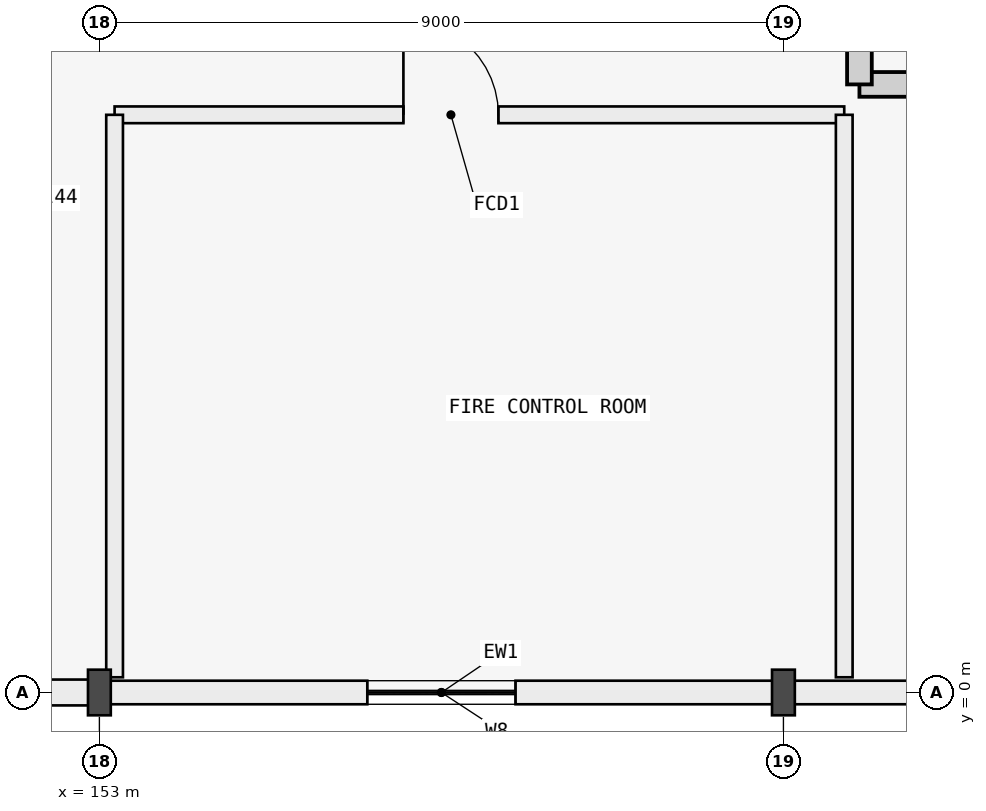
"""IFC4 building model, lengths in metres.
Left out: names, types, materials, properties, quantities, classifications, styles, units other than length and angle.
Written with IfcOpenShell. Run it as: python <this file> out.ifc"""

import sys

from ifc_helpers import new_model, si_unit, direction, frame, frame_2d, origin, origin_2d, place, context, subcontext, project, spatial, rectangle, i_section, extrude, element, fill, save


model = new_model("IFC4")
c1 = context("Model", 3, precision=1e-05, world=origin(), true_north=direction((0.0, 1.0)))
c2 = subcontext(c1, "Body", "Model", "MODEL_VIEW")
j1 = project(units=[si_unit("LENGTHUNIT", "METRE"), si_unit("PLANEANGLEUNIT", "RADIAN")], contexts=[c1])
p1 = place(None, origin())
s1 = spatial("IfcSite", under=j1, at=p1, CompositionType="ELEMENT")
p2 = place(p1, origin())
s2 = spatial("IfcBuilding", under=s1, at=p2, CompositionType="ELEMENT")
p3 = place(p2, origin())
s3 = spatial("IfcBuildingStorey", under=s2, at=p3, CompositionType="ELEMENT", Elevation=0.0)
for number, where, z_axis, x_axis in (
    (1, (153.0, 0.0, 0.0), (0.0, 0.0, 1.0), (1.0, 0.0, 0.0)),
    (2, (162.0, 0.0, 0.0), (0.0, 0.0, 1.0), (1.0, 0.0, 0.0)),
):
    element("IfcColumn", number, at=place(p3, frame(where, z_axis=z_axis, x_axis=x_axis)), inside=s3, PredefinedType="COLUMN", context=c2, shape_type="SweptSolid", body=[
        extrude(i_section(OverallWidth=0.3, OverallDepth=0.6, WebThickness=0.015, FlangeThickness=0.03, FilletRadius=0.027, at=origin_2d()), origin(), (0.0, 0.0, 1.0), 4.2),
    ])
p4 = place(p3, frame((144.009, 0.0, 0.0), z_axis=(0.0, 0.0, 1.0), x_axis=(1.0, 0.0, 0.0)))
e3 = element("IfcWall", 3, at=p4, inside=s3, PredefinedType="STANDARD", context=c2, shape_type="SweptSolid", body=[
    extrude(rectangle(XDim=8.983, YDim=0.34, at=frame_2d((4.492, 0.0))), origin(), (0.0, 0.0, 1.0), 3.625),
])
p5 = place(p4, frame((2.892, 0.0, 0.0)))
e4 = element("IfcOpeningElement", 4, at=p5, cuts=e3, PredefinedType="OPENING", context=c2, shape_type="SweptSolid", body=[
    extrude(rectangle(XDim=3.2, YDim=3.0, at=frame_2d((1.6, 1.5))), frame((0.0, 0.18, 0.0), z_axis=(0.0, -1.0, 0.0), x_axis=(1.0, 0.0, 0.0)), (0.0, 0.0, 1.0), 0.36),
])
p6 = place(p3, frame((153.008, 0.0, 0.0), z_axis=(0.0, 0.0, 1.0), x_axis=(1.0, 0.0, 0.0)))
e5 = element("IfcWall", 5, at=p6, inside=s3, PredefinedType="STANDARD", context=c2, shape_type="SweptSolid", body=[
    extrude(rectangle(XDim=8.984, YDim=0.31, at=frame_2d((4.492, 0.0))), origin(), (0.0, 0.0, 1.0), 3.625),
])
p7 = place(p6, frame((3.517, 0.0, 0.95)))
e6 = element("IfcOpeningElement", 6, at=p7, cuts=e5, PredefinedType="OPENING", context=c2, shape_type="SweptSolid", body=[
    extrude(rectangle(XDim=1.95, YDim=1.65, at=frame_2d((0.975, 0.825))), frame((0.0, 0.165, 0.0), z_axis=(0.0, -1.0, 0.0), x_axis=(1.0, 0.0, 0.0)), (0.0, 0.0, 1.0), 0.33),
])
p8 = place(p3, frame((162.008, 0.0, 0.0), z_axis=(0.0, 0.0, 1.0), x_axis=(1.0, 0.0, 0.0)))
e7 = element("IfcWall", 7, at=p8, inside=s3, PredefinedType="STANDARD", context=c2, shape_type="SweptSolid", body=[
    extrude(rectangle(XDim=8.984, YDim=0.31, at=frame_2d((4.492, 0.0))), origin(), (0.0, 0.0, 1.0), 3.625),
])
p9 = place(p8, frame((3.392, 0.0, 0.0)))
e8 = element("IfcOpeningElement", 8, at=p9, cuts=e7, PredefinedType="OPENING", context=c2, shape_type="SweptSolid", body=[
    extrude(rectangle(XDim=2.2, YDim=2.4, at=frame_2d((1.1, 1.2))), frame((0.0, 0.165, 0.0), z_axis=(0.0, -1.0, 0.0), x_axis=(1.0, 0.0, 0.0)), (0.0, 0.0, 1.0), 0.33),
])
p10 = place(p3, frame((163.0, 8.0, 0.0), z_axis=(0.0, 0.0, 1.0), x_axis=(1.0, 0.0, 0.0)))
e9 = element("IfcWall", 9, at=p10, inside=s3, PredefinedType="SHEAR", context=c2, shape_type="SweptSolid", body=[
    extrude(rectangle(XDim=10.8, YDim=0.325, at=frame_2d((5.4, 0.0))), origin(), (0.0, 0.0, 1.0), 3.95),
])
p11 = place(p3, frame((163.0, 17.5, 0.0), z_axis=(0.0, 0.0, 1.0), x_axis=(0.0, -1.0, 0.0)))
e10 = element("IfcWall", 10, at=p11, inside=s3, PredefinedType="SHEAR", context=c2, shape_type="SweptSolid", body=[
    extrude(rectangle(XDim=9.5, YDim=0.325, at=frame_2d((4.75, 0.0))), origin(), (0.0, 0.0, 1.0), 3.95),
])
p12 = place(p3, frame((153.2, 7.6, 0.0), z_axis=(0.0, 0.0, 1.0), x_axis=(1.0, 0.0, 0.0)))
e11 = element("IfcWall", 11, at=p12, inside=s3, PredefinedType="PARTITIONING", context=c2, shape_type="SweptSolid", body=[
    extrude(rectangle(XDim=9.6, YDim=0.22, at=frame_2d((4.8, 0.0))), origin(), (0.0, 0.0, 1.0), 3.95),
])
p13 = place(p12, frame((3.8, 0.0, 0.0)))
e12 = element("IfcOpeningElement", 12, at=p13, cuts=e11, PredefinedType="OPENING", context=c2, shape_type="SweptSolid", body=[
    extrude(rectangle(XDim=1.25, YDim=2.2, at=frame_2d((0.625, 1.1))), frame((0.0, 0.12, 0.0), z_axis=(0.0, -1.0, 0.0), x_axis=(1.0, 0.0, 0.0)), (0.0, 0.0, 1.0), 0.24),
])
p14 = place(p3, frame((153.2, 0.2, 0.0), z_axis=(0.0, 0.0, 1.0), x_axis=(0.0, 1.0, 0.0)))
e13 = element("IfcWall", 13, at=p14, inside=s3, PredefinedType="PARTITIONING", context=c2, shape_type="SweptSolid", body=[
    extrude(rectangle(XDim=7.4, YDim=0.22, at=frame_2d((3.7, 0.0))), origin(), (0.0, 0.0, 1.0), 3.475),
])
p15 = place(p3, frame((162.8, 0.2, 0.0), z_axis=(0.0, 0.0, 1.0), x_axis=(0.0, 1.0, 0.0)))
e14 = element("IfcWall", 14, at=p15, inside=s3, PredefinedType="PARTITIONING", context=c2, shape_type="SweptSolid", body=[
    extrude(rectangle(XDim=7.4, YDim=0.22, at=frame_2d((3.7, 0.0))), origin(), (0.0, 0.0, 1.0), 3.95),
])
p16 = place(p7, origin())
e15 = element("IfcWindow", 15, at=p16, inside=s3, PartitioningType="SINGLE_PANEL", PredefinedType="WINDOW", context=c2, shape_type="SweptSolid", body=[
    extrude(rectangle(XDim=1.95, YDim=1.65, at=frame_2d((0.975, 0.825))), frame((0.0, 0.03, 0.0), z_axis=(0.0, -1.0, 0.0), x_axis=(1.0, 0.0, 0.0)), (0.0, 0.0, 1.0), 0.06),
])
fill(e6, e15)
p17 = place(p13, origin())
e16 = element("IfcDoor", 16, at=p17, inside=s3, OperationType="SINGLE_SWING_LEFT", PredefinedType="DOOR", context=c2, shape_type="SweptSolid", body=[
    extrude(rectangle(XDim=1.25, YDim=2.2, at=frame_2d((0.625, 1.1))), frame((0.0, 0.025, 0.0), z_axis=(0.0, -1.0, 0.0), x_axis=(1.0, 0.0, 0.0)), (0.0, 0.0, 1.0), 0.05),
])
fill(e12, e16)
save(model, sys.argv[1])
